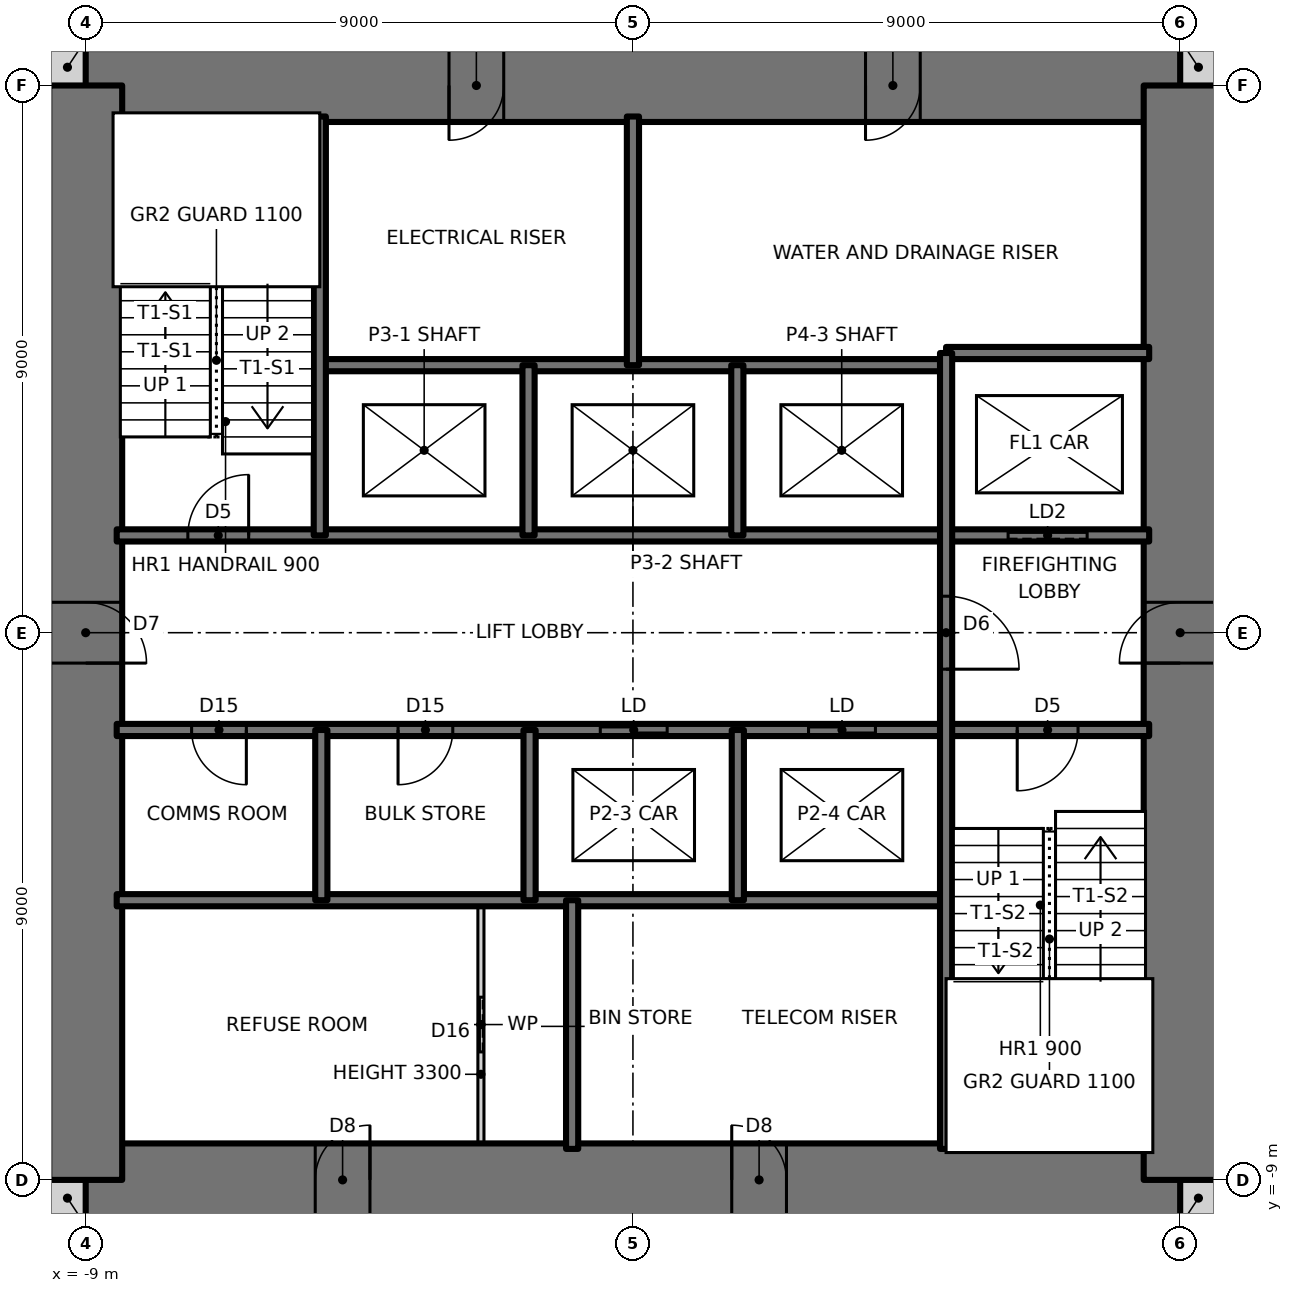
"""IFC4 building model, lengths in metres.
Left out: names, types, materials, properties, quantities, classifications, styles, units other than length and angle.
Written with IfcOpenShell. Run it as: python <this file> out.ifc"""

import sys

from ifc_helpers import new_model, si_unit, direction, frame, frame_2d, origin, place, context, subcontext, project, spatial, rectangle, extrude, element, fill, save


model = new_model("IFC4")
c1 = context("Model", 3, precision=1e-05, world=origin(), true_north=direction((0.0, 1.0)))
c2 = subcontext(c1, "Body", "Model", "MODEL_VIEW")
j1 = project(units=[si_unit("LENGTHUNIT", "METRE"), si_unit("PLANEANGLEUNIT", "RADIAN")], contexts=[c1])
p1 = place(None, origin())
s1 = spatial("IfcSite", under=j1, at=p1, CompositionType="ELEMENT")
p2 = place(p1, origin())
s2 = spatial("IfcBuilding", under=s1, at=p2, CompositionType="ELEMENT")
p3 = place(p2, frame((0.0, 0.0, 108.5)))
s3 = spatial("IfcBuildingStorey", under=s2, at=p3, CompositionType="ELEMENT", Elevation=108.5)
for number, where, z_axis, x_axis in (
    (1, (-9.6, -9.3, 0.0), (0.0, 0.0, 1.0), (1.0, 0.0, 0.0)),
    (2, (9.0, -9.3, 0.0), (0.0, 0.0, 1.0), (1.0, 0.0, 0.0)),
    (3, (9.0, 9.3, 0.0), (0.0, 0.0, 1.0), (1.0, 0.0, 0.0)),
    (4, (-9.6, 9.3, 0.0), (0.0, 0.0, 1.0), (1.0, 0.0, 0.0)),
):
    element("IfcWall", number, at=place(p3, frame(where, z_axis=z_axis, x_axis=x_axis)), inside=s3, PredefinedType="SOLIDWALL", context=c2, shape_type="SweptSolid", body=[
        extrude(rectangle(XDim=0.6, YDim=0.6, at=frame_2d((0.3, 0.0))), origin(), (0.0, 0.0, 1.0), 3.5),
    ])
p4 = place(p3, frame((-9.0, -9.0, 0.0), z_axis=(0.0, 0.0, 1.0), x_axis=(1.0, 0.0, 0.0)))
e5 = element("IfcWall", 5, at=p4, inside=s3, PredefinedType="SHEAR", context=c2, shape_type="SweptSolid", body=[
    extrude(rectangle(XDim=18.0, YDim=1.2, at=frame_2d((9.0, 0.0))), origin(), (0.0, 0.0, 1.0), 3.5),
])
p5 = place(p4, frame((3.775, 0.0, 0.0)))
e6 = element("IfcOpeningElement", 6, at=p5, cuts=e5, PredefinedType="OPENING", context=c2, shape_type="SweptSolid", body=[
    extrude(rectangle(XDim=0.9, YDim=2.1, at=frame_2d((0.45, 1.05))), frame((0.0, 0.61, 0.0), z_axis=(0.0, -1.0, 0.0), x_axis=(1.0, 0.0, 0.0)), (0.0, 0.0, 1.0), 1.22),
])
p6 = place(p4, frame((10.625, 0.0, 0.0)))
e7 = element("IfcOpeningElement", 7, at=p6, cuts=e5, PredefinedType="OPENING", context=c2, shape_type="SweptSolid", body=[
    extrude(rectangle(XDim=0.9, YDim=2.1, at=frame_2d((0.45, 1.05))), frame((0.0, 0.61, 0.0), z_axis=(0.0, -1.0, 0.0), x_axis=(1.0, 0.0, 0.0)), (0.0, 0.0, 1.0), 1.22),
])
p7 = place(p3, frame((9.0, 9.0, 0.0), z_axis=(0.0, 0.0, 1.0), x_axis=(-1.0, 0.0, 0.0)))
e8 = element("IfcWall", 8, at=p7, inside=s3, PredefinedType="SHEAR", context=c2, shape_type="SweptSolid", body=[
    extrude(rectangle(XDim=18.0, YDim=1.2, at=frame_2d((9.0, 0.0))), origin(), (0.0, 0.0, 1.0), 3.5),
])
p8 = place(p7, frame((11.125, 0.0, 0.0)))
e9 = element("IfcOpeningElement", 9, at=p8, cuts=e8, PredefinedType="OPENING", context=c2, shape_type="SweptSolid", body=[
    extrude(rectangle(XDim=0.9, YDim=2.1, at=frame_2d((0.45, 1.05))), frame((0.0, 0.61, 0.0), z_axis=(0.0, -1.0, 0.0), x_axis=(1.0, 0.0, 0.0)), (0.0, 0.0, 1.0), 1.22),
])
p9 = place(p7, frame((4.275, 0.0, 0.0)))
e10 = element("IfcOpeningElement", 10, at=p9, cuts=e8, PredefinedType="OPENING", context=c2, shape_type="SweptSolid", body=[
    extrude(rectangle(XDim=0.9, YDim=2.1, at=frame_2d((0.45, 1.05))), frame((0.0, 0.61, 0.0), z_axis=(0.0, -1.0, 0.0), x_axis=(1.0, 0.0, 0.0)), (0.0, 0.0, 1.0), 1.22),
])
p10 = place(p3, frame((9.0, -9.0, 0.0), z_axis=(0.0, 0.0, 1.0), x_axis=(0.0, 1.0, 0.0)))
e11 = element("IfcWall", 11, at=p10, inside=s3, PredefinedType="SHEAR", context=c2, shape_type="SweptSolid", body=[
    extrude(rectangle(XDim=18.0, YDim=1.2, at=frame_2d((9.0, 0.0))), origin(), (0.0, 0.0, 1.0), 3.5),
])
p11 = place(p10, frame((8.5, 0.0, 0.0)))
e12 = element("IfcOpeningElement", 12, at=p11, cuts=e11, PredefinedType="OPENING", context=c2, shape_type="SweptSolid", body=[
    extrude(rectangle(XDim=1.0, YDim=2.1, at=frame_2d((0.5, 1.05))), frame((0.0, 0.61, 0.0), z_axis=(0.0, -1.0, 0.0), x_axis=(1.0, 0.0, 0.0)), (0.0, 0.0, 1.0), 1.22),
])
p12 = place(p3, frame((-9.0, 9.0, 0.0), z_axis=(0.0, 0.0, 1.0), x_axis=(0.0, -1.0, 0.0)))
e13 = element("IfcWall", 13, at=p12, inside=s3, PredefinedType="SHEAR", context=c2, shape_type="SweptSolid", body=[
    extrude(rectangle(XDim=18.0, YDim=1.2, at=frame_2d((9.0, 0.0))), origin(), (0.0, 0.0, 1.0), 3.5),
])
p13 = place(p12, frame((8.5, 0.0, 0.0)))
e14 = element("IfcOpeningElement", 14, at=p13, cuts=e13, PredefinedType="OPENING", context=c2, shape_type="SweptSolid", body=[
    extrude(rectangle(XDim=1.0, YDim=2.1, at=frame_2d((0.5, 1.05))), frame((0.0, 0.61, 0.0), z_axis=(0.0, -1.0, 0.0), x_axis=(1.0, 0.0, 0.0)), (0.0, 0.0, 1.0), 1.22),
])
p14 = place(p3, frame((-8.49, -4.4, 0.0), z_axis=(0.0, 0.0, 1.0), x_axis=(1.0, 0.0, 0.0)))
e15 = element("IfcWall", 15, at=p14, inside=s3, PredefinedType="SOLIDWALL", context=c2, shape_type="SweptSolid", body=[
    extrude(rectangle(XDim=13.64, YDim=0.2, at=frame_2d((6.82, 0.0))), origin(), (0.0, 0.0, 1.0), 3.5),
])
p15 = place(p3, frame((-8.49, -1.6, 0.0), z_axis=(0.0, 0.0, 1.0), x_axis=(1.0, 0.0, 0.0)))
e16 = element("IfcWall", 16, at=p15, inside=s3, PredefinedType="SOLIDWALL", context=c2, shape_type="SweptSolid", body=[
    extrude(rectangle(XDim=16.98, YDim=0.2, at=frame_2d((8.49, 0.0))), origin(), (0.0, 0.0, 1.0), 3.5),
])
p16 = place(p15, frame((14.81, 0.0, 0.0)))
e17 = element("IfcOpeningElement", 17, at=p16, cuts=e16, PredefinedType="OPENING", context=c2, shape_type="SweptSolid", body=[
    extrude(rectangle(XDim=1.0, YDim=2.1, at=frame_2d((0.5, 1.05))), frame((0.0, 0.11, 0.0), z_axis=(0.0, -1.0, 0.0), x_axis=(1.0, 0.0, 0.0)), (0.0, 0.0, 1.0), 0.22),
])
p17 = place(p15, frame((1.232, 0.0, 0.0)))
e18 = element("IfcOpeningElement", 18, at=p17, cuts=e16, PredefinedType="OPENING", context=c2, shape_type="SweptSolid", body=[
    extrude(rectangle(XDim=0.9, YDim=2.1, at=frame_2d((0.45, 1.05))), frame((0.0, 0.11, 0.0), z_axis=(0.0, -1.0, 0.0), x_axis=(1.0, 0.0, 0.0)), (0.0, 0.0, 1.0), 0.22),
])
p18 = place(p15, frame((4.627, 0.0, 0.0)))
e19 = element("IfcOpeningElement", 19, at=p18, cuts=e16, PredefinedType="OPENING", context=c2, shape_type="SweptSolid", body=[
    extrude(rectangle(XDim=0.9, YDim=2.1, at=frame_2d((0.45, 1.05))), frame((0.0, 0.11, 0.0), z_axis=(0.0, -1.0, 0.0), x_axis=(1.0, 0.0, 0.0)), (0.0, 0.0, 1.0), 0.22),
])
p19 = place(p15, frame((7.953, 0.0, 0.0)))
e20 = element("IfcOpeningElement", 20, at=p19, cuts=e16, PredefinedType="OPENING", context=c2, shape_type="SweptSolid", body=[
    extrude(rectangle(XDim=1.1, YDim=2.1, at=frame_2d((0.55, 1.05))), frame((0.0, 0.11, 0.0), z_axis=(0.0, -1.0, 0.0), x_axis=(1.0, 0.0, 0.0)), (0.0, 0.0, 1.0), 0.22),
])
p20 = place(p15, frame((11.378, 0.0, 0.0)))
e21 = element("IfcOpeningElement", 21, at=p20, cuts=e16, PredefinedType="OPENING", context=c2, shape_type="SweptSolid", body=[
    extrude(rectangle(XDim=1.1, YDim=2.1, at=frame_2d((0.55, 1.05))), frame((0.0, 0.11, 0.0), z_axis=(0.0, -1.0, 0.0), x_axis=(1.0, 0.0, 0.0)), (0.0, 0.0, 1.0), 0.22),
])
p21 = place(p3, frame((-8.49, 1.6, 0.0), z_axis=(0.0, 0.0, 1.0), x_axis=(1.0, 0.0, 0.0)))
e22 = element("IfcWall", 22, at=p21, inside=s3, PredefinedType="SOLIDWALL", context=c2, shape_type="SweptSolid", body=[
    extrude(rectangle(XDim=16.98, YDim=0.2, at=frame_2d((8.49, 0.0))), origin(), (0.0, 0.0, 1.0), 3.5),
])
p22 = place(p21, frame((1.17, 0.0, 0.0)))
e23 = element("IfcOpeningElement", 23, at=p22, cuts=e22, PredefinedType="OPENING", context=c2, shape_type="SweptSolid", body=[
    extrude(rectangle(XDim=1.0, YDim=2.1, at=frame_2d((0.5, 1.05))), frame((0.0, 0.11, 0.0), z_axis=(0.0, -1.0, 0.0), x_axis=(1.0, 0.0, 0.0)), (0.0, 0.0, 1.0), 0.22),
])
p23 = place(p21, frame((14.66, 0.0, 0.0)))
e24 = element("IfcOpeningElement", 24, at=p23, cuts=e22, PredefinedType="OPENING", context=c2, shape_type="SweptSolid", body=[
    extrude(rectangle(XDim=1.3, YDim=2.1, at=frame_2d((0.65, 1.05))), frame((0.0, 0.11, 0.0), z_axis=(0.0, -1.0, 0.0), x_axis=(1.0, 0.0, 0.0)), (0.0, 0.0, 1.0), 0.22),
])
p24 = place(p3, frame((-5.15, 4.4, 0.0), z_axis=(0.0, 0.0, 1.0), x_axis=(1.0, 0.0, 0.0)))
e25 = element("IfcWall", 25, at=p24, inside=s3, PredefinedType="SOLIDWALL", context=c2, shape_type="SweptSolid", body=[
    extrude(rectangle(XDim=10.3, YDim=0.2, at=frame_2d((5.15, 0.0))), origin(), (0.0, 0.0, 1.0), 3.5),
])
p25 = place(p3, frame((5.15, 4.6, 0.0), z_axis=(0.0, 0.0, 1.0), x_axis=(1.0, 0.0, 0.0)))
e26 = element("IfcWall", 26, at=p25, inside=s3, PredefinedType="SOLIDWALL", context=c2, shape_type="SweptSolid", body=[
    extrude(rectangle(XDim=3.34, YDim=0.2, at=frame_2d((1.67, 0.0))), origin(), (0.0, 0.0, 1.0), 3.5),
])
p26 = place(p3, frame((5.15, -8.49, 0.0), z_axis=(0.0, 0.0, 1.0), x_axis=(0.0, 1.0, 0.0)))
e27 = element("IfcWall", 27, at=p26, inside=s3, PredefinedType="SOLIDWALL", context=c2, shape_type="SweptSolid", body=[
    extrude(rectangle(XDim=13.09, YDim=0.2, at=frame_2d((6.545, 0.0))), origin(), (0.0, 0.0, 1.0), 3.5),
])
p27 = place(p26, frame((7.89, 0.0, 0.0)))
e28 = element("IfcOpeningElement", 28, at=p27, cuts=e27, PredefinedType="OPENING", context=c2, shape_type="SweptSolid", body=[
    extrude(rectangle(XDim=1.2, YDim=2.1, at=frame_2d((0.6, 1.05))), frame((0.0, 0.11, 0.0), z_axis=(0.0, -1.0, 0.0), x_axis=(1.0, 0.0, 0.0)), (0.0, 0.0, 1.0), 0.22),
])
for number, where, z_axis, x_axis in (
    (29, (1.725, -4.4, 0.0), (0.0, 0.0, 1.0), (0.0, 1.0, 0.0)),
    (30, (1.717, 1.6, 0.0), (0.0, 0.0, 1.0), (0.0, 1.0, 0.0)),
):
    element("IfcWall", number, at=place(p3, frame(where, z_axis=z_axis, x_axis=x_axis)), inside=s3, PredefinedType="SOLIDWALL", context=c2, shape_type="SweptSolid", body=[
        extrude(rectangle(XDim=2.8, YDim=0.2, at=frame_2d((1.4, 0.0))), origin(), (0.0, 0.0, 1.0), 3.5),
    ])
for number, where, z_axis, x_axis in (
    (31, (0.0, 4.4, 0.0), (0.0, 0.0, 1.0), (0.0, 1.0, 0.0)),
    (32, (-1.0, -8.49, 0.0), (0.0, 0.0, 1.0), (0.0, 1.0, 0.0)),
):
    element("IfcWall", number, at=place(p3, frame(where, z_axis=z_axis, x_axis=x_axis)), inside=s3, PredefinedType="SOLIDWALL", context=c2, shape_type="SweptSolid", body=[
        extrude(rectangle(XDim=4.09, YDim=0.2, at=frame_2d((2.045, 0.0))), origin(), (0.0, 0.0, 1.0), 3.5),
    ])
for number, where, z_axis, x_axis in (
    (33, (-1.7, -4.4, 0.0), (0.0, 0.0, 1.0), (0.0, 1.0, 0.0)),
    (34, (-1.717, 1.6, 0.0), (0.0, 0.0, 1.0), (0.0, 1.0, 0.0)),
):
    element("IfcWall", number, at=place(p3, frame(where, z_axis=z_axis, x_axis=x_axis)), inside=s3, PredefinedType="SOLIDWALL", context=c2, shape_type="SweptSolid", body=[
        extrude(rectangle(XDim=2.8, YDim=0.2, at=frame_2d((1.4, 0.0))), origin(), (0.0, 0.0, 1.0), 3.5),
    ])
p28 = place(p3, frame((-2.5, -8.49, 0.0), z_axis=(0.0, 0.0, 1.0), x_axis=(0.0, 1.0, 0.0)))
e35 = element("IfcWall", 35, at=p28, inside=s3, PredefinedType="PARTITIONING", context=c2, shape_type="SweptSolid", body=[
    extrude(rectangle(XDim=4.09, YDim=0.1, at=frame_2d((2.045, 0.0))), origin(), (0.0, 0.0, 1.0), 3.3),
])
p29 = place(p28, frame((1.595, 0.0, 0.0)))
e36 = element("IfcOpeningElement", 36, at=p29, cuts=e35, PredefinedType="OPENING", context=c2, shape_type="SweptSolid", body=[
    extrude(rectangle(XDim=0.9, YDim=2.1, at=frame_2d((0.45, 1.05))), frame((0.0, 0.06, 0.0), z_axis=(0.0, -1.0, 0.0), x_axis=(1.0, 0.0, 0.0)), (0.0, 0.0, 1.0), 0.12),
])
p30 = place(p3, frame((-5.125, -4.4, 0.0), z_axis=(0.0, 0.0, 1.0), x_axis=(0.0, 1.0, 0.0)))
e37 = element("IfcWall", 37, at=p30, inside=s3, PredefinedType="SOLIDWALL", context=c2, shape_type="SweptSolid", body=[
    extrude(rectangle(XDim=2.8, YDim=0.2, at=frame_2d((1.4, 0.0))), origin(), (0.0, 0.0, 1.0), 3.5),
])
p31 = place(p3, frame((-5.15, 1.6, 0.0), z_axis=(0.0, 0.0, 1.0), x_axis=(0.0, 1.0, 0.0)))
e38 = element("IfcWall", 38, at=p31, inside=s3, PredefinedType="SOLIDWALL", context=c2, shape_type="SweptSolid", body=[
    extrude(rectangle(XDim=6.89, YDim=0.2, at=frame_2d((3.445, 0.0))), origin(), (0.0, 0.0, 1.0), 3.5),
])
p32 = place(p22, origin())
e39 = element("IfcDoor", 39, at=p32, inside=s3, OperationType="SINGLE_SWING_RIGHT", PredefinedType="DOOR", context=c2, shape_type="SweptSolid", body=[
    extrude(rectangle(XDim=1.0, YDim=2.1, at=frame_2d((0.5, 1.05))), frame((0.0, 0.025, 0.0), z_axis=(0.0, -1.0, 0.0), x_axis=(1.0, 0.0, 0.0)), (0.0, 0.0, 1.0), 0.05),
])
fill(e23, e39)
p33 = place(p16, frame((1.0, 0.0, 0.0), z_axis=(0.0, 0.0, 1.0), x_axis=(-1.0, 0.0, 0.0)))
e40 = element("IfcDoor", 40, at=p33, inside=s3, OperationType="SINGLE_SWING_RIGHT", PredefinedType="DOOR", context=c2, shape_type="SweptSolid", body=[
    extrude(rectangle(XDim=1.0, YDim=2.1, at=frame_2d((0.5, 1.05))), frame((0.0, 0.025, 0.0), z_axis=(0.0, -1.0, 0.0), x_axis=(1.0, 0.0, 0.0)), (0.0, 0.0, 1.0), 0.05),
])
fill(e17, e40)
p34 = place(p27, frame((1.2, 0.0, 0.0), z_axis=(0.0, 0.0, 1.0), x_axis=(-1.0, 0.0, 0.0)))
e41 = element("IfcDoor", 41, at=p34, inside=s3, OperationType="SINGLE_SWING_RIGHT", PredefinedType="DOOR", context=c2, shape_type="SweptSolid", body=[
    extrude(rectangle(XDim=1.2, YDim=2.1, at=frame_2d((0.6, 1.05))), frame((0.0, 0.025, 0.0), z_axis=(0.0, -1.0, 0.0), x_axis=(1.0, 0.0, 0.0)), (0.0, 0.0, 1.0), 0.05),
])
fill(e28, e41)
p35 = place(p17, frame((0.9, 0.0, 0.0), z_axis=(0.0, 0.0, 1.0), x_axis=(-1.0, 0.0, 0.0)))
e42 = element("IfcDoor", 42, at=p35, inside=s3, OperationType="SINGLE_SWING_LEFT", PredefinedType="DOOR", context=c2, shape_type="SweptSolid", body=[
    extrude(rectangle(XDim=0.9, YDim=2.1, at=frame_2d((0.45, 1.05))), frame((0.0, 0.025, 0.0), z_axis=(0.0, -1.0, 0.0), x_axis=(1.0, 0.0, 0.0)), (0.0, 0.0, 1.0), 0.05),
])
fill(e18, e42)
p36 = place(p18, frame((0.9, 0.0, 0.0), z_axis=(0.0, 0.0, 1.0), x_axis=(-1.0, 0.0, 0.0)))
e43 = element("IfcDoor", 43, at=p36, inside=s3, OperationType="SINGLE_SWING_RIGHT", PredefinedType="DOOR", context=c2, shape_type="SweptSolid", body=[
    extrude(rectangle(XDim=0.9, YDim=2.1, at=frame_2d((0.45, 1.05))), frame((0.0, 0.025, 0.0), z_axis=(0.0, -1.0, 0.0), x_axis=(1.0, 0.0, 0.0)), (0.0, 0.0, 1.0), 0.05),
])
fill(e19, e43)
p37 = place(p29, origin())
e44 = element("IfcDoor", 44, at=p37, inside=s3, OperationType="SLIDING_TO_LEFT", PredefinedType="DOOR", context=c2, shape_type="SweptSolid", body=[
    extrude(rectangle(XDim=0.9, YDim=2.1, at=frame_2d((0.45, 1.05))), frame((0.0, 0.025, 0.0), z_axis=(0.0, -1.0, 0.0), x_axis=(1.0, 0.0, 0.0)), (0.0, 0.0, 1.0), 0.05),
])
fill(e36, e44)
p38 = place(p13, origin())
e45 = element("IfcDoor", 45, at=p38, inside=s3, OperationType="SINGLE_SWING_RIGHT", PredefinedType="DOOR", context=c2, shape_type="SweptSolid", body=[
    extrude(rectangle(XDim=1.0, YDim=2.1, at=frame_2d((0.5, 1.05))), frame((0.0, 0.025, 0.0), z_axis=(0.0, -1.0, 0.0), x_axis=(1.0, 0.0, 0.0)), (0.0, 0.0, 1.0), 0.05),
])
fill(e14, e45)
p39 = place(p11, origin())
e46 = element("IfcDoor", 46, at=p39, inside=s3, OperationType="SINGLE_SWING_LEFT", PredefinedType="DOOR", context=c2, shape_type="SweptSolid", body=[
    extrude(rectangle(XDim=1.0, YDim=2.1, at=frame_2d((0.5, 1.05))), frame((0.0, 0.025, 0.0), z_axis=(0.0, -1.0, 0.0), x_axis=(1.0, 0.0, 0.0)), (0.0, 0.0, 1.0), 0.05),
])
fill(e12, e46)
p40 = place(p8, origin())
e47 = element("IfcDoor", 47, at=p40, inside=s3, OperationType="SINGLE_SWING_RIGHT", PredefinedType="DOOR", context=c2, shape_type="SweptSolid", body=[
    extrude(rectangle(XDim=0.9, YDim=2.1, at=frame_2d((0.45, 1.05))), frame((0.0, 0.025, 0.0), z_axis=(0.0, -1.0, 0.0), x_axis=(1.0, 0.0, 0.0)), (0.0, 0.0, 1.0), 0.05),
])
fill(e9, e47)
p41 = place(p9, origin())
e48 = element("IfcDoor", 48, at=p41, inside=s3, OperationType="SINGLE_SWING_RIGHT", PredefinedType="DOOR", context=c2, shape_type="SweptSolid", body=[
    extrude(rectangle(XDim=0.9, YDim=2.1, at=frame_2d((0.45, 1.05))), frame((0.0, 0.025, 0.0), z_axis=(0.0, -1.0, 0.0), x_axis=(1.0, 0.0, 0.0)), (0.0, 0.0, 1.0), 0.05),
])
fill(e10, e48)
p42 = place(p5, origin())
e49 = element("IfcDoor", 49, at=p42, inside=s3, OperationType="SINGLE_SWING_RIGHT", PredefinedType="DOOR", context=c2, shape_type="SweptSolid", body=[
    extrude(rectangle(XDim=0.9, YDim=2.1, at=frame_2d((0.45, 1.05))), frame((0.0, 0.025, 0.0), z_axis=(0.0, -1.0, 0.0), x_axis=(1.0, 0.0, 0.0)), (0.0, 0.0, 1.0), 0.05),
])
fill(e6, e49)
p43 = place(p6, origin())
e50 = element("IfcDoor", 50, at=p43, inside=s3, OperationType="SINGLE_SWING_LEFT", PredefinedType="DOOR", context=c2, shape_type="SweptSolid", body=[
    extrude(rectangle(XDim=0.9, YDim=2.1, at=frame_2d((0.45, 1.05))), frame((0.0, 0.025, 0.0), z_axis=(0.0, -1.0, 0.0), x_axis=(1.0, 0.0, 0.0)), (0.0, 0.0, 1.0), 0.05),
])
fill(e7, e50)
p44 = place(p19, origin())
e51 = element("IfcDoor", 51, at=p44, inside=s3, OperationType="DOUBLE_DOOR_SLIDING", PredefinedType="DOOR", context=c2, shape_type="SweptSolid", body=[
    extrude(rectangle(XDim=1.1, YDim=2.1, at=frame_2d((0.55, 1.05))), frame((0.0, 0.025, 0.0), z_axis=(0.0, -1.0, 0.0), x_axis=(1.0, 0.0, 0.0)), (0.0, 0.0, 1.0), 0.05),
])
fill(e20, e51)
p45 = place(p20, origin())
e52 = element("IfcDoor", 52, at=p45, inside=s3, OperationType="DOUBLE_DOOR_SLIDING", PredefinedType="DOOR", context=c2, shape_type="SweptSolid", body=[
    extrude(rectangle(XDim=1.1, YDim=2.1, at=frame_2d((0.55, 1.05))), frame((0.0, 0.025, 0.0), z_axis=(0.0, -1.0, 0.0), x_axis=(1.0, 0.0, 0.0)), (0.0, 0.0, 1.0), 0.05),
])
fill(e21, e52)
p46 = place(p23, origin())
e53 = element("IfcDoor", 53, at=p46, inside=s3, OperationType="SLIDING_TO_LEFT", PredefinedType="DOOR", context=c2, shape_type="SweptSolid", body=[
    extrude(rectangle(XDim=1.3, YDim=2.1, at=frame_2d((0.65, 1.05))), frame((0.0, 0.025, 0.0), z_axis=(0.0, -1.0, 0.0), x_axis=(1.0, 0.0, 0.0)), (0.0, 0.0, 1.0), 0.05),
])
fill(e24, e53)
save(model, sys.argv[1])
